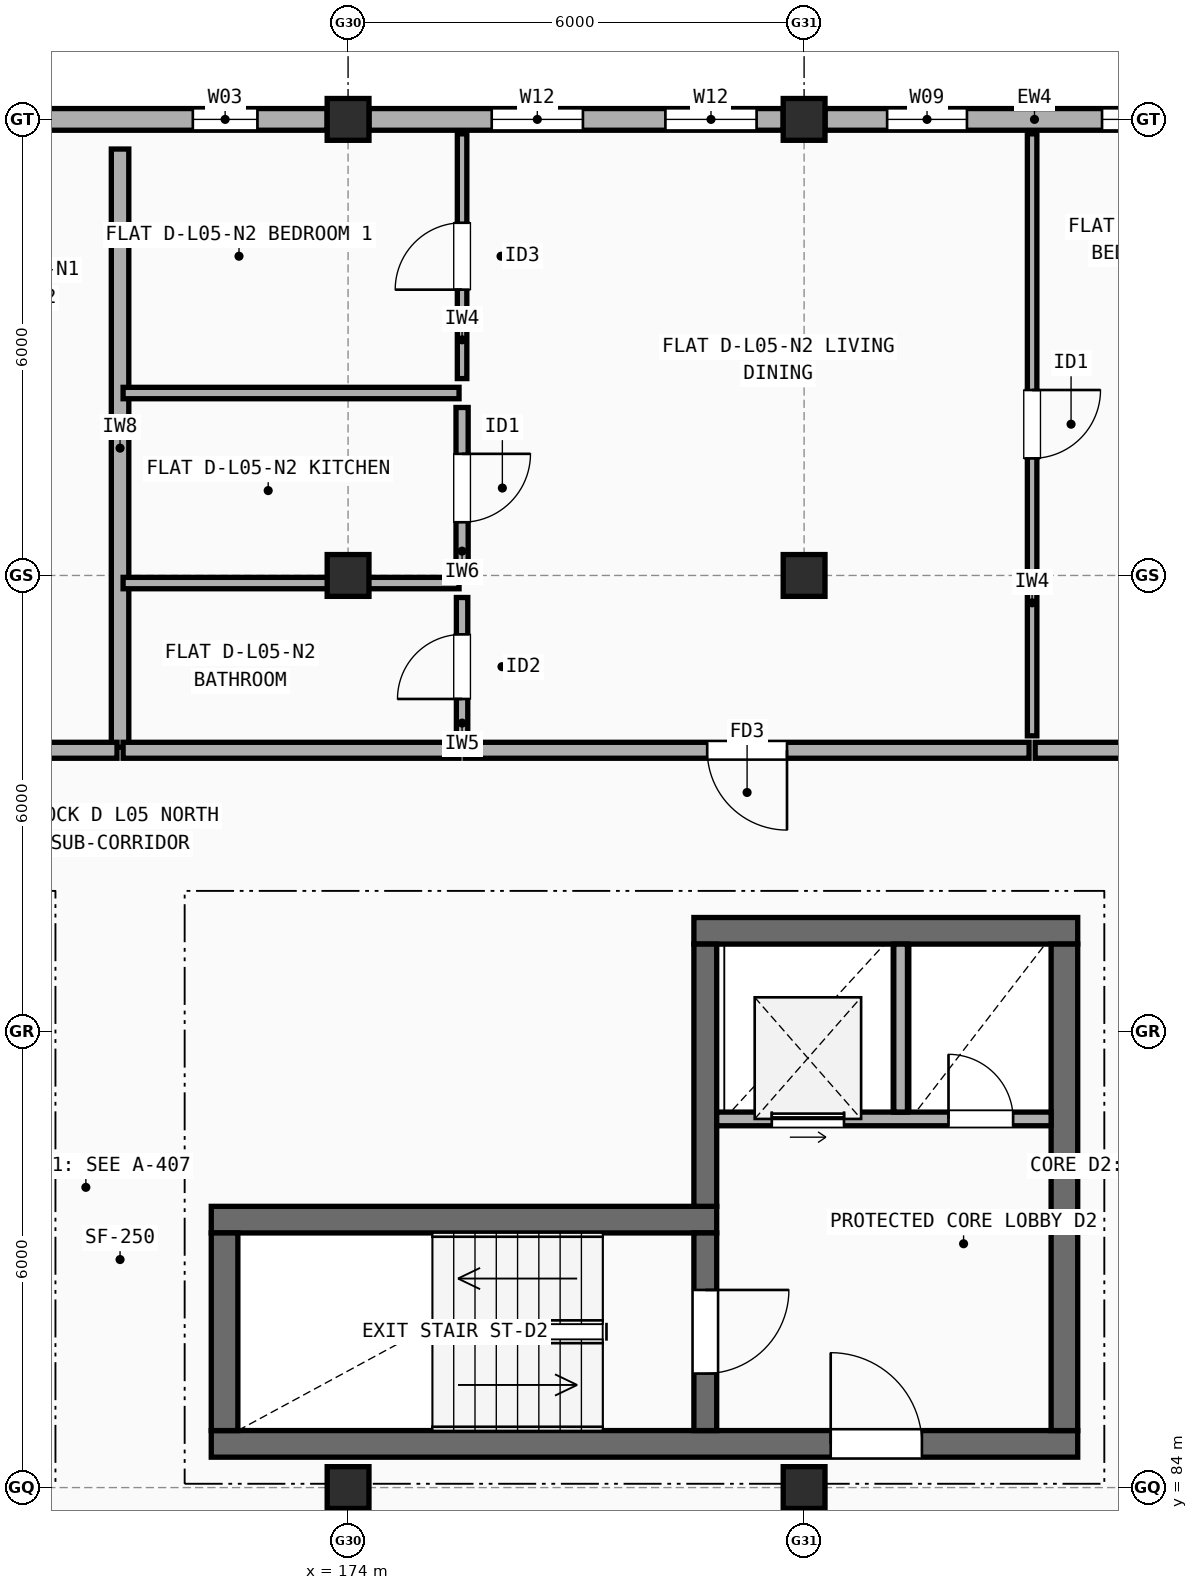
"""IFC4 building model, lengths in metres.
Left out: names, types, materials, properties, quantities, classifications, styles, units other than length and angle.
Written with IfcOpenShell. Run it as: python <this file> out.ifc"""

import sys

from ifc_helpers import new_model, si_unit, direction, frame, frame_2d, origin, origin_2d, place, context, subcontext, project, spatial, rectangle, extrude, element, fill, save


model = new_model("IFC4")
c1 = context("Model", 3, precision=1e-05, world=origin(), true_north=direction((0.0, 1.0)))
c2 = subcontext(c1, "Body", "Model", "MODEL_VIEW")
j1 = project(units=[si_unit("LENGTHUNIT", "METRE"), si_unit("PLANEANGLEUNIT", "RADIAN")], contexts=[c1])
p1 = place(None, origin())
s1 = spatial("IfcSite", under=j1, at=p1, CompositionType="ELEMENT")
p2 = place(p1, origin())
s2 = spatial("IfcBuilding", under=s1, at=p2, CompositionType="ELEMENT")
p3 = place(p2, frame((0.0, 0.0, 17.3)))
s3 = spatial("IfcBuildingStorey", under=s2, at=p3, CompositionType="ELEMENT", Elevation=17.3)
for number, where, z_axis, x_axis in (
    (1, (174.0, 84.0, 0.0), (0.0, 0.0, 1.0), (1.0, 0.0, 0.0)),
    (2, (174.0, 96.0, 0.0), (0.0, 0.0, 1.0), (1.0, 0.0, 0.0)),
    (3, (174.0, 102.0, 0.0), (0.0, 0.0, 1.0), (1.0, 0.0, 0.0)),
    (4, (180.0, 84.0, 0.0), (0.0, 0.0, 1.0), (1.0, 0.0, 0.0)),
    (5, (180.0, 96.0, 0.0), (0.0, 0.0, 1.0), (1.0, 0.0, 0.0)),
    (6, (180.0, 102.0, 0.0), (0.0, 0.0, 1.0), (1.0, 0.0, 0.0)),
):
    element("IfcColumn", number, at=place(p3, frame(where, z_axis=z_axis, x_axis=x_axis)), inside=s3, PredefinedType="COLUMN", context=c2, shape_type="SweptSolid", body=[
        extrude(rectangle(XDim=0.55, YDim=0.55, at=origin_2d()), origin(), (0.0, 0.0, 1.0), 2.965),
    ])
p4 = place(p3, frame((185.75, 102.0, 0.0), z_axis=(0.0, 0.0, 1.0), x_axis=(-1.0, 0.0, 0.0)))
e7 = element("IfcWall", 7, at=p4, inside=s3, PredefinedType="STANDARD", context=c2, shape_type="SweptSolid", body=[
    extrude(rectangle(XDim=5.475, YDim=0.285, at=frame_2d((2.738, 0.0))), origin(), (0.0, 0.0, 1.0), 2.447),
])
p5 = place(p4, frame((0.88, 0.0, 0.9)))
e8 = element("IfcOpeningElement", 8, at=p5, cuts=e7, PredefinedType="OPENING", context=c2, shape_type="SweptSolid", body=[
    extrude(rectangle(XDim=0.95, YDim=1.35, at=frame_2d((0.475, 0.675))), frame((0.0, 0.152, 0.0), z_axis=(0.0, -1.0, 0.0), x_axis=(1.0, 0.0, 0.0)), (0.0, 0.0, 1.0), 0.305),
])
p6 = place(p4, frame((3.607, 0.0, 0.9)))
e9 = element("IfcOpeningElement", 9, at=p6, cuts=e7, PredefinedType="OPENING", context=c2, shape_type="SweptSolid", body=[
    extrude(rectangle(XDim=1.05, YDim=1.35, at=frame_2d((0.525, 0.675))), frame((0.0, 0.152, 0.0), z_axis=(0.0, -1.0, 0.0), x_axis=(1.0, 0.0, 0.0)), (0.0, 0.0, 1.0), 0.305),
])
p7 = place(p3, frame((179.725, 102.0, 0.0), z_axis=(0.0, 0.0, 1.0), x_axis=(-1.0, 0.0, 0.0)))
e10 = element("IfcWall", 10, at=p7, inside=s3, PredefinedType="STANDARD", context=c2, shape_type="SweptSolid", body=[
    extrude(rectangle(XDim=5.45, YDim=0.285, at=frame_2d((2.725, 0.0))), origin(), (0.0, 0.0, 1.0), 2.447),
])
p8 = place(p7, frame((0.35, 0.0, 0.9)))
e11 = element("IfcOpeningElement", 11, at=p8, cuts=e10, PredefinedType="OPENING", context=c2, shape_type="SweptSolid", body=[
    extrude(rectangle(XDim=1.2, YDim=1.35, at=frame_2d((0.6, 0.675))), frame((0.0, 0.152, 0.0), z_axis=(0.0, -1.0, 0.0), x_axis=(1.0, 0.0, 0.0)), (0.0, 0.0, 1.0), 0.305),
])
p9 = place(p7, frame((2.635, 0.0, 0.9)))
e12 = element("IfcOpeningElement", 12, at=p9, cuts=e10, PredefinedType="OPENING", context=c2, shape_type="SweptSolid", body=[
    extrude(rectangle(XDim=1.2, YDim=1.35, at=frame_2d((0.6, 0.675))), frame((0.0, 0.152, 0.0), z_axis=(0.0, -1.0, 0.0), x_axis=(1.0, 0.0, 0.0)), (0.0, 0.0, 1.0), 0.305),
])
p10 = place(p3, frame((173.725, 102.0, 0.0), z_axis=(0.0, 0.0, 1.0), x_axis=(-1.0, 0.0, 0.0)))
e13 = element("IfcWall", 13, at=p10, inside=s3, PredefinedType="STANDARD", context=c2, shape_type="SweptSolid", body=[
    extrude(rectangle(XDim=5.45, YDim=0.285, at=frame_2d((2.725, 0.0))), origin(), (0.0, 0.0, 1.0), 2.447),
])
p11 = place(p10, frame((0.917, 0.0, 0.9)))
e14 = element("IfcOpeningElement", 14, at=p11, cuts=e13, PredefinedType="OPENING", context=c2, shape_type="SweptSolid", body=[
    extrude(rectangle(XDim=0.85, YDim=1.25, at=frame_2d((0.425, 0.625))), frame((0.0, 0.152, 0.0), z_axis=(0.0, -1.0, 0.0), x_axis=(1.0, 0.0, 0.0)), (0.0, 0.0, 1.0), 0.305),
])
p12 = place(p10, frame((3.657, 0.0, 0.9)))
e15 = element("IfcOpeningElement", 15, at=p12, cuts=e13, PredefinedType="OPENING", context=c2, shape_type="SweptSolid", body=[
    extrude(rectangle(XDim=0.9, YDim=1.3, at=frame_2d((0.45, 0.65))), frame((0.0, 0.152, 0.0), z_axis=(0.0, -1.0, 0.0), x_axis=(1.0, 0.0, 0.0)), (0.0, 0.0, 1.0), 0.305),
])
p13 = place(p3, frame((172.2, 84.575, 0.0), z_axis=(0.0, 0.0, 1.0), x_axis=(1.0, 0.0, 0.0)))
e16 = element("IfcWall", 16, at=p13, inside=s3, PredefinedType="SHEAR", context=c2, shape_type="SweptSolid", body=[
    extrude(rectangle(XDim=11.4, YDim=0.35, at=frame_2d((5.7, 0.0))), origin(), (0.0, 0.0, 1.0), 2.965),
])
p14 = place(p13, frame((8.15, 0.0, 0.0)))
e17 = element("IfcOpeningElement", 17, at=p14, cuts=e16, PredefinedType="OPENING", context=c2, shape_type="SweptSolid", body=[
    extrude(rectangle(XDim=1.2, YDim=2.15, at=frame_2d((0.6, 1.075))), frame((0.0, 0.185, 0.0), z_axis=(0.0, -1.0, 0.0), x_axis=(1.0, 0.0, 0.0)), (0.0, 0.0, 1.0), 0.37),
])
p15 = place(p3, frame((178.85, 87.525, 0.0), z_axis=(0.0, 0.0, 1.0), x_axis=(-1.0, 0.0, 0.0)))
e18 = element("IfcWall", 18, at=p15, inside=s3, PredefinedType="SHEAR", context=c2, shape_type="SweptSolid", body=[
    extrude(rectangle(XDim=6.65, YDim=0.35, at=frame_2d((3.325, 0.0))), origin(), (0.0, 0.0, 1.0), 2.965),
])
p16 = place(p3, frame((172.375, 87.35, 0.0), z_axis=(0.0, 0.0, 1.0), x_axis=(0.0, -1.0, 0.0)))
e19 = element("IfcWall", 19, at=p16, inside=s3, PredefinedType="SHEAR", context=c2, shape_type="SweptSolid", body=[
    extrude(rectangle(XDim=2.6, YDim=0.35, at=frame_2d((1.3, 0.0))), origin(), (0.0, 0.0, 1.0), 2.965),
])
p17 = place(p3, frame((178.7, 84.75, 0.0), z_axis=(0.0, 0.0, 1.0), x_axis=(0.0, 1.0, 0.0)))
e20 = element("IfcWall", 20, at=p17, inside=s3, PredefinedType="SHEAR", context=c2, shape_type="SweptSolid", body=[
    extrude(rectangle(XDim=2.6, YDim=0.3, at=frame_2d((1.3, 0.0))), origin(), (0.0, 0.0, 1.0), 2.965),
])
p18 = place(p17, frame((0.75, 0.0, 0.0)))
e21 = element("IfcOpeningElement", 21, at=p18, cuts=e20, PredefinedType="OPENING", context=c2, shape_type="SweptSolid", body=[
    extrude(rectangle(XDim=1.1, YDim=2.15, at=frame_2d((0.55, 1.075))), frame((0.0, 0.16, 0.0), z_axis=(0.0, -1.0, 0.0), x_axis=(1.0, 0.0, 0.0)), (0.0, 0.0, 1.0), 0.32),
])
p19 = place(p3, frame((183.6, 91.325, 0.0), z_axis=(0.0, 0.0, 1.0), x_axis=(-1.0, 0.0, 0.0)))
e22 = element("IfcWall", 22, at=p19, inside=s3, PredefinedType="SHEAR", context=c2, shape_type="SweptSolid", body=[
    extrude(rectangle(XDim=5.05, YDim=0.35, at=frame_2d((2.525, 0.0))), origin(), (0.0, 0.0, 1.0), 2.965),
])
p20 = place(p3, frame((183.425, 84.75, 0.0), z_axis=(0.0, 0.0, 1.0), x_axis=(0.0, 1.0, 0.0)))
e23 = element("IfcWall", 23, at=p20, inside=s3, PredefinedType="SHEAR", context=c2, shape_type="SweptSolid", body=[
    extrude(rectangle(XDim=6.4, YDim=0.35, at=frame_2d((3.2, 0.0))), origin(), (0.0, 0.0, 1.0), 2.965),
])
p21 = place(p3, frame((178.7, 87.7, 0.0), z_axis=(0.0, 0.0, 1.0), x_axis=(0.0, 1.0, 0.0)))
e24 = element("IfcWall", 24, at=p21, inside=s3, PredefinedType="SHEAR", context=c2, shape_type="SweptSolid", body=[
    extrude(rectangle(XDim=3.45, YDim=0.3, at=frame_2d((1.725, 0.0))), origin(), (0.0, 0.0, 1.0), 2.965),
])
p22 = place(p3, frame((178.85, 88.85, 0.0), z_axis=(0.0, 0.0, 1.0), x_axis=(1.0, 0.0, 0.0)))
e25 = element("IfcWall", 25, at=p22, inside=s3, PredefinedType="SOLIDWALL", context=c2, shape_type="SweptSolid", body=[
    extrude(rectangle(XDim=4.4, YDim=0.18, at=frame_2d((2.2, 0.0))), origin(), (0.0, 0.0, 1.0), 2.965),
])
p23 = place(p22, frame((0.725, 0.0, 0.0)))
e26 = element("IfcOpeningElement", 26, at=p23, cuts=e25, PredefinedType="OPENING", context=c2, shape_type="SweptSolid", body=[
    extrude(rectangle(XDim=0.95, YDim=2.15, at=frame_2d((0.475, 1.075))), frame((0.0, 0.1, 0.0), z_axis=(0.0, -1.0, 0.0), x_axis=(1.0, 0.0, 0.0)), (0.0, 0.0, 1.0), 0.2),
])
p24 = place(p22, frame((3.05, 0.0, 0.0)))
e27 = element("IfcOpeningElement", 27, at=p24, cuts=e25, PredefinedType="OPENING", context=c2, shape_type="SweptSolid", body=[
    extrude(rectangle(XDim=0.85, YDim=2.1, at=frame_2d((0.425, 1.05))), frame((0.0, 0.1, 0.0), z_axis=(0.0, -1.0, 0.0), x_axis=(1.0, 0.0, 0.0)), (0.0, 0.0, 1.0), 0.2),
])
p25 = place(p3, frame((181.27, 88.94, 0.0), z_axis=(0.0, 0.0, 1.0), x_axis=(0.0, 1.0, 0.0)))
e28 = element("IfcWall", 28, at=p25, inside=s3, PredefinedType="SOLIDWALL", context=c2, shape_type="SweptSolid", body=[
    extrude(rectangle(XDim=2.21, YDim=0.18, at=frame_2d((1.105, 0.0))), origin(), (0.0, 0.0, 1.0), 2.965),
])
p26 = place(p3, frame((171.0, 93.74, 0.0), z_axis=(0.0, 0.0, 1.0), x_axis=(0.0, 1.0, 0.0)))
e29 = element("IfcWall", 29, at=p26, inside=s3, PredefinedType="SOLIDWALL", context=c2, shape_type="SweptSolid", body=[
    extrude(rectangle(XDim=7.87, YDim=0.23, at=frame_2d((3.935, 0.0))), origin(), (0.0, 0.0, 1.0), 2.508),
])
p27 = place(p3, frame((168.04, 93.7, 0.0), z_axis=(0.0, 0.0, 1.0), x_axis=(1.0, 0.0, 0.0)))
e30 = element("IfcWall", 30, at=p27, inside=s3, PredefinedType="SOLIDWALL", context=c2, shape_type="SweptSolid", body=[
    extrude(rectangle(XDim=2.92, YDim=0.21, at=frame_2d((1.46, 0.0))), origin(), (0.0, 0.0, 1.0), 2.508),
])
p28 = place(p3, frame((171.04, 93.7, 0.0), z_axis=(0.0, 0.0, 1.0), x_axis=(1.0, 0.0, 0.0)))
e31 = element("IfcWall", 31, at=p28, inside=s3, PredefinedType="SOLIDWALL", context=c2, shape_type="SweptSolid", body=[
    extrude(rectangle(XDim=4.42, YDim=0.21, at=frame_2d((2.21, 0.0))), origin(), (0.0, 0.0, 1.0), 2.965),
])
p29 = place(p3, frame((175.54, 93.7, 0.0), z_axis=(0.0, 0.0, 1.0), x_axis=(1.0, 0.0, 0.0)))
e32 = element("IfcWall", 32, at=p29, inside=s3, PredefinedType="SOLIDWALL", context=c2, shape_type="SweptSolid", body=[
    extrude(rectangle(XDim=7.42, YDim=0.21, at=frame_2d((3.71, 0.0))), origin(), (0.0, 0.0, 1.0), 2.965),
])
p30 = place(p29, frame((3.185, 0.0, 0.0)))
e33 = element("IfcOpeningElement", 33, at=p30, cuts=e32, PredefinedType="OPENING", context=c2, shape_type="SweptSolid", body=[
    extrude(rectangle(XDim=1.05, YDim=2.15, at=frame_2d((0.525, 1.075))), frame((0.0, 0.115, 0.0), z_axis=(0.0, -1.0, 0.0), x_axis=(1.0, 0.0, 0.0)), (0.0, 0.0, 1.0), 0.23),
])
p31 = place(p3, frame((175.5, 98.59, 0.0), z_axis=(0.0, 0.0, 1.0), x_axis=(0.0, 1.0, 0.0)))
e34 = element("IfcWall", 34, at=p31, inside=s3, PredefinedType="PARTITIONING", context=c2, shape_type="SweptSolid", body=[
    extrude(rectangle(XDim=3.22, YDim=0.125, at=frame_2d((1.61, 0.0))), origin(), (0.0, 0.0, 1.0), 2.965),
])
p32 = place(p31, frame((1.17, 0.0, 0.0)))
e35 = element("IfcOpeningElement", 35, at=p32, cuts=e34, PredefinedType="OPENING", context=c2, shape_type="SweptSolid", body=[
    extrude(rectangle(XDim=0.88, YDim=2.1, at=frame_2d((0.44, 1.05))), frame((0.0, 0.073, 0.0), z_axis=(0.0, -1.0, 0.0), x_axis=(1.0, 0.0, 0.0)), (0.0, 0.0, 1.0), 0.145),
])
p33 = place(p3, frame((175.5, 96.09, 0.0), z_axis=(0.0, 0.0, 1.0), x_axis=(0.0, 1.0, 0.0)))
e36 = element("IfcWall", 36, at=p33, inside=s3, PredefinedType="PLUMBINGWALL", context=c2, shape_type="SweptSolid", body=[
    extrude(rectangle(XDim=2.12, YDim=0.16, at=frame_2d((1.06, 0.0))), origin(), (0.0, 0.0, 1.0), 2.408),
])
p34 = place(p33, frame((0.61, 0.0, 0.0)))
e37 = element("IfcOpeningElement", 37, at=p34, cuts=e36, PredefinedType="OPENING", context=c2, shape_type="SweptSolid", body=[
    extrude(rectangle(XDim=0.9, YDim=2.1, at=frame_2d((0.45, 1.05))), frame((0.0, 0.09, 0.0), z_axis=(0.0, -1.0, 0.0), x_axis=(1.0, 0.0, 0.0)), (0.0, 0.0, 1.0), 0.18),
])
p35 = place(p3, frame((175.5, 93.89, 0.0), z_axis=(0.0, 0.0, 1.0), x_axis=(0.0, 1.0, 0.0)))
e38 = element("IfcWall", 38, at=p35, inside=s3, PredefinedType="PARTITIONING", context=c2, shape_type="SweptSolid", body=[
    extrude(rectangle(XDim=1.82, YDim=0.15, at=frame_2d((0.91, 0.0))), origin(), (0.0, 0.0, 1.0), 2.965),
])
p36 = place(p35, frame((0.485, 0.0, 0.0)))
e39 = element("IfcOpeningElement", 39, at=p36, cuts=e38, PredefinedType="OPENING", context=c2, shape_type="SweptSolid", body=[
    extrude(rectangle(XDim=0.85, YDim=2.1, at=frame_2d((0.425, 1.05))), frame((0.0, 0.085, 0.0), z_axis=(0.0, -1.0, 0.0), x_axis=(1.0, 0.0, 0.0)), (0.0, 0.0, 1.0), 0.17),
])
p37 = place(p3, frame((171.04, 98.4, 0.0), z_axis=(0.0, 0.0, 1.0), x_axis=(1.0, 0.0, 0.0)))
e40 = element("IfcWall", 40, at=p37, inside=s3, PredefinedType="PARTITIONING", context=c2, shape_type="SweptSolid", body=[
    extrude(rectangle(XDim=4.42, YDim=0.15, at=frame_2d((2.21, 0.0))), origin(), (0.0, 0.0, 1.0), 2.458),
])
p38 = place(p3, frame((171.04, 95.9, 0.0), z_axis=(0.0, 0.0, 1.0), x_axis=(1.0, 0.0, 0.0)))
e41 = element("IfcWall", 41, at=p38, inside=s3, PredefinedType="PARTITIONING", context=c2, shape_type="SweptSolid", body=[
    extrude(rectangle(XDim=4.42, YDim=0.15, at=frame_2d((2.21, 0.0))), origin(), (0.0, 0.0, 1.0), 2.408),
])
p39 = place(p3, frame((183.04, 93.7, 0.0), z_axis=(0.0, 0.0, 1.0), x_axis=(1.0, 0.0, 0.0)))
e42 = element("IfcWall", 42, at=p39, inside=s3, PredefinedType="SOLIDWALL", context=c2, shape_type="SweptSolid", body=[
    extrude(rectangle(XDim=2.92, YDim=0.21, at=frame_2d((1.46, 0.0))), origin(), (0.0, 0.0, 1.0), 2.447),
])
p40 = place(p3, frame((183.0, 93.89, 0.0), z_axis=(0.0, 0.0, 1.0), x_axis=(0.0, 1.0, 0.0)))
e43 = element("IfcWall", 43, at=p40, inside=s3, PredefinedType="PARTITIONING", context=c2, shape_type="SweptSolid", body=[
    extrude(rectangle(XDim=7.92, YDim=0.125, at=frame_2d((3.96, 0.0))), origin(), (0.0, 0.0, 1.0), 2.548),
])
p41 = place(p40, frame((3.65, 0.0, 0.0)))
e44 = element("IfcOpeningElement", 44, at=p41, cuts=e43, PredefinedType="OPENING", context=c2, shape_type="SweptSolid", body=[
    extrude(rectangle(XDim=0.9, YDim=2.1, at=frame_2d((0.45, 1.05))), frame((0.0, 0.073, 0.0), z_axis=(0.0, -1.0, 0.0), x_axis=(1.0, 0.0, 0.0)), (0.0, 0.0, 1.0), 0.145),
])
p42 = place(p5, origin())
e45 = element("IfcWindow", 45, at=p42, inside=s3, PartitioningType="SINGLE_PANEL", PredefinedType="WINDOW", context=c2, shape_type="SweptSolid", body=[
    extrude(rectangle(XDim=0.95, YDim=1.35, at=frame_2d((0.475, 0.675))), frame((0.0, 0.03, 0.0), z_axis=(0.0, -1.0, 0.0), x_axis=(1.0, 0.0, 0.0)), (0.0, 0.0, 1.0), 0.06),
])
fill(e8, e45)
p43 = place(p6, origin())
e46 = element("IfcWindow", 46, at=p43, inside=s3, PartitioningType="SINGLE_PANEL", PredefinedType="WINDOW", context=c2, shape_type="SweptSolid", body=[
    extrude(rectangle(XDim=1.05, YDim=1.35, at=frame_2d((0.525, 0.675))), frame((0.0, 0.03, 0.0), z_axis=(0.0, -1.0, 0.0), x_axis=(1.0, 0.0, 0.0)), (0.0, 0.0, 1.0), 0.06),
])
fill(e9, e46)
p44 = place(p8, origin())
e47 = element("IfcWindow", 47, at=p44, inside=s3, PartitioningType="SINGLE_PANEL", PredefinedType="WINDOW", context=c2, shape_type="SweptSolid", body=[
    extrude(rectangle(XDim=1.2, YDim=1.35, at=frame_2d((0.6, 0.675))), frame((0.0, 0.03, 0.0), z_axis=(0.0, -1.0, 0.0), x_axis=(1.0, 0.0, 0.0)), (0.0, 0.0, 1.0), 0.06),
])
fill(e11, e47)
p45 = place(p9, origin())
e48 = element("IfcWindow", 48, at=p45, inside=s3, PartitioningType="SINGLE_PANEL", PredefinedType="WINDOW", context=c2, shape_type="SweptSolid", body=[
    extrude(rectangle(XDim=1.2, YDim=1.35, at=frame_2d((0.6, 0.675))), frame((0.0, 0.03, 0.0), z_axis=(0.0, -1.0, 0.0), x_axis=(1.0, 0.0, 0.0)), (0.0, 0.0, 1.0), 0.06),
])
fill(e12, e48)
p46 = place(p11, origin())
e49 = element("IfcWindow", 49, at=p46, inside=s3, PartitioningType="SINGLE_PANEL", PredefinedType="WINDOW", context=c2, shape_type="SweptSolid", body=[
    extrude(rectangle(XDim=0.85, YDim=1.25, at=frame_2d((0.425, 0.625))), frame((0.0, 0.03, 0.0), z_axis=(0.0, -1.0, 0.0), x_axis=(1.0, 0.0, 0.0)), (0.0, 0.0, 1.0), 0.06),
])
fill(e14, e49)
p47 = place(p14, origin())
e50 = element("IfcDoor", 50, at=p47, inside=s3, OperationType="SINGLE_SWING_LEFT", PredefinedType="DOOR", context=c2, shape_type="SweptSolid", body=[
    extrude(rectangle(XDim=1.2, YDim=2.15, at=frame_2d((0.6, 1.075))), frame((0.0, 0.025, 0.0), z_axis=(0.0, -1.0, 0.0), x_axis=(1.0, 0.0, 0.0)), (0.0, 0.0, 1.0), 0.05),
])
fill(e17, e50)
p48 = place(p18, origin())
e51 = element("IfcDoor", 51, at=p48, inside=s3, OperationType="SINGLE_SWING_RIGHT", PredefinedType="DOOR", context=c2, shape_type="SweptSolid", body=[
    extrude(rectangle(XDim=1.1, YDim=2.15, at=frame_2d((0.55, 1.075))), frame((0.0, 0.025, 0.0), z_axis=(0.0, -1.0, 0.0), x_axis=(1.0, 0.0, 0.0)), (0.0, 0.0, 1.0), 0.05),
])
fill(e21, e51)
p49 = place(p23, origin())
e52 = element("IfcDoor", 52, at=p49, inside=s3, OperationType="SLIDING_TO_LEFT", PredefinedType="DOOR", context=c2, shape_type="SweptSolid", body=[
    extrude(rectangle(XDim=0.95, YDim=2.15, at=frame_2d((0.475, 1.075))), frame((0.0, 0.025, 0.0), z_axis=(0.0, -1.0, 0.0), x_axis=(1.0, 0.0, 0.0)), (0.0, 0.0, 1.0), 0.05),
])
fill(e26, e52)
p50 = place(p24, frame((0.85, 0.0, 0.0), z_axis=(0.0, 0.0, 1.0), x_axis=(-1.0, 0.0, 0.0)))
e53 = element("IfcDoor", 53, at=p50, inside=s3, OperationType="SINGLE_SWING_LEFT", PredefinedType="DOOR", context=c2, shape_type="SweptSolid", body=[
    extrude(rectangle(XDim=0.85, YDim=2.1, at=frame_2d((0.425, 1.05))), frame((0.0, 0.025, 0.0), z_axis=(0.0, -1.0, 0.0), x_axis=(1.0, 0.0, 0.0)), (0.0, 0.0, 1.0), 0.05),
])
fill(e27, e53)
p51 = place(p30, origin())
e54 = element("IfcDoor", 54, at=p51, inside=s3, OperationType="SINGLE_SWING_RIGHT", PredefinedType="DOOR", context=c2, shape_type="SweptSolid", body=[
    extrude(rectangle(XDim=1.05, YDim=2.15, at=frame_2d((0.525, 1.075))), frame((0.0, 0.025, 0.0), z_axis=(0.0, -1.0, 0.0), x_axis=(1.0, 0.0, 0.0)), (0.0, 0.0, 1.0), 0.05),
])
fill(e33, e54)
p52 = place(p32, origin())
e55 = element("IfcDoor", 55, at=p52, inside=s3, OperationType="SINGLE_SWING_LEFT", PredefinedType="DOOR", context=c2, shape_type="SweptSolid", body=[
    extrude(rectangle(XDim=0.88, YDim=2.1, at=frame_2d((0.44, 1.05))), frame((0.0, 0.025, 0.0), z_axis=(0.0, -1.0, 0.0), x_axis=(1.0, 0.0, 0.0)), (0.0, 0.0, 1.0), 0.05),
])
fill(e35, e55)
p53 = place(p34, origin())
e56 = element("IfcDoor", 56, at=p53, inside=s3, OperationType="SINGLE_SWING_RIGHT", PredefinedType="DOOR", context=c2, shape_type="SweptSolid", body=[
    extrude(rectangle(XDim=0.9, YDim=2.1, at=frame_2d((0.45, 1.05))), frame((0.0, 0.025, 0.0), z_axis=(0.0, -1.0, 0.0), x_axis=(1.0, 0.0, 0.0)), (0.0, 0.0, 1.0), 0.05),
])
fill(e37, e56)
p54 = place(p36, origin())
e57 = element("IfcDoor", 57, at=p54, inside=s3, OperationType="SINGLE_SWING_LEFT", PredefinedType="DOOR", context=c2, shape_type="SweptSolid", body=[
    extrude(rectangle(XDim=0.85, YDim=2.1, at=frame_2d((0.425, 1.05))), frame((0.0, 0.025, 0.0), z_axis=(0.0, -1.0, 0.0), x_axis=(1.0, 0.0, 0.0)), (0.0, 0.0, 1.0), 0.05),
])
fill(e39, e57)
p55 = place(p41, origin())
e58 = element("IfcDoor", 58, at=p55, inside=s3, OperationType="SINGLE_SWING_RIGHT", PredefinedType="DOOR", context=c2, shape_type="SweptSolid", body=[
    extrude(rectangle(XDim=0.9, YDim=2.1, at=frame_2d((0.45, 1.05))), frame((0.0, 0.025, 0.0), z_axis=(0.0, -1.0, 0.0), x_axis=(1.0, 0.0, 0.0)), (0.0, 0.0, 1.0), 0.05),
])
fill(e44, e58)
save(model, sys.argv[1])
